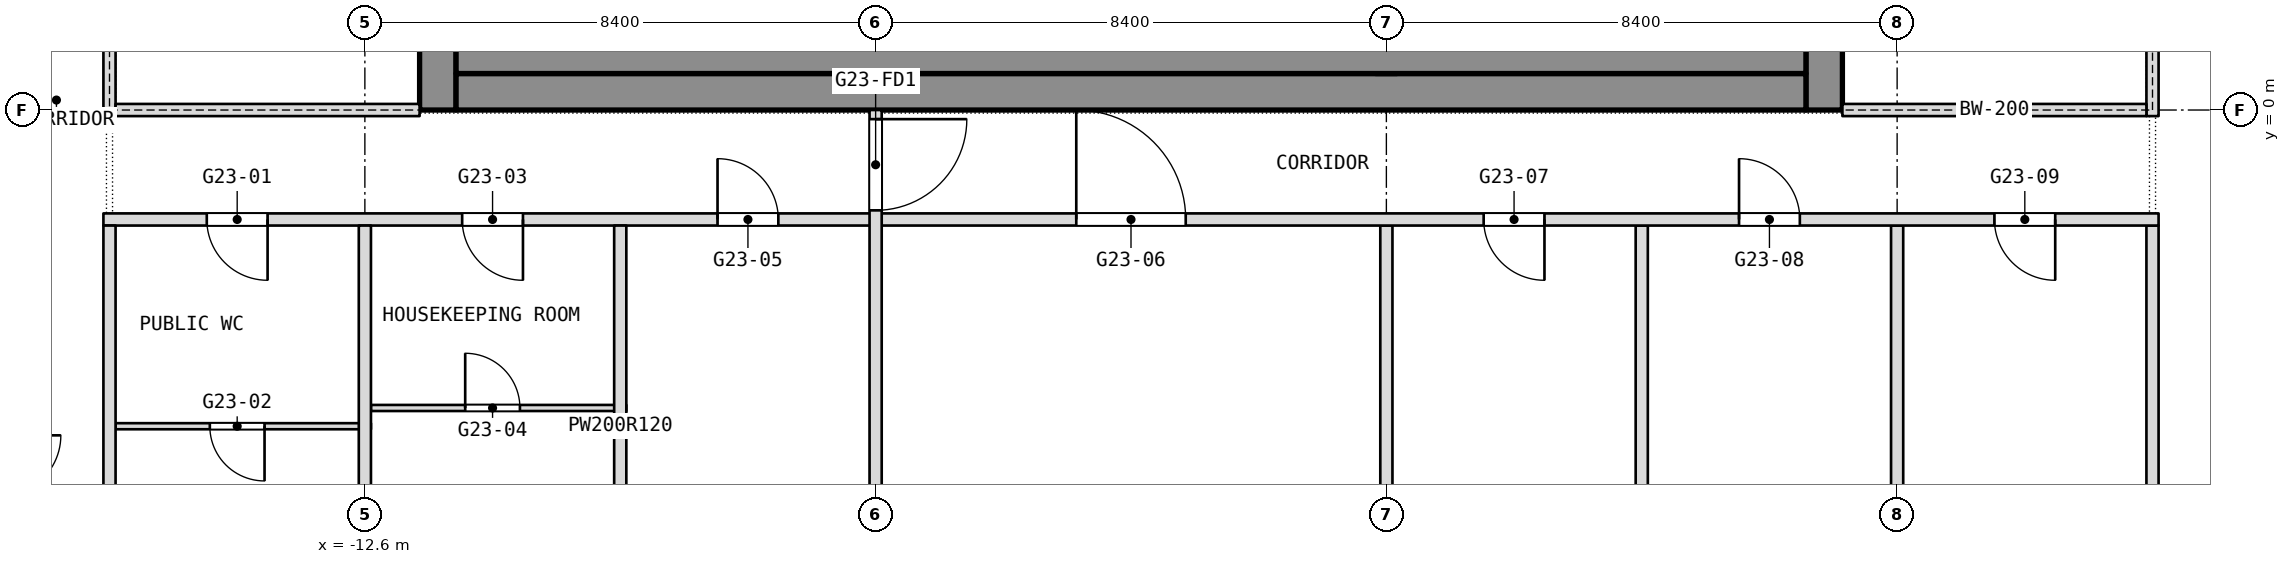
"""IFC4 building model, lengths in metres.
Left out: names, types, materials, properties, quantities, classifications, styles, units other than length and angle.
Written with IfcOpenShell. Run it as: python <this file> out.ifc"""

import sys

from ifc_helpers import new_model, si_unit, direction, frame, frame_2d, origin, place, context, subcontext, project, spatial, rectangle, extrude, element, fill, save


model = new_model("IFC4")
c1 = context("Model", 3, precision=1e-05, world=origin(), true_north=direction((0.0, 1.0)))
c2 = subcontext(c1, "Body", "Model", "MODEL_VIEW")
j1 = project(units=[si_unit("LENGTHUNIT", "METRE"), si_unit("PLANEANGLEUNIT", "RADIAN")], contexts=[c1])
p1 = place(None, origin())
s1 = spatial("IfcSite", under=j1, at=p1, CompositionType="ELEMENT")
p2 = place(p1, origin())
s2 = spatial("IfcBuilding", under=s1, at=p2, CompositionType="ELEMENT")
p3 = place(p2, frame((0.0, 0.0, 270.5)))
s3 = spatial("IfcBuildingStorey", under=s2, at=p3, CompositionType="ELEMENT", Elevation=270.5)
p4 = place(p3, frame((11.4, 0.0, 0.0), z_axis=(0.0, 0.0, 1.0), x_axis=(0.0, 1.0, 0.0)))
e1 = element("IfcWall", 1, at=p4, inside=s3, PredefinedType="SHEAR", context=c2, shape_type="SweptSolid", body=[
    extrude(rectangle(XDim=16.8, YDim=0.6, at=frame_2d((8.4, 0.0))), origin(), (0.0, 0.0, 1.0), 3.6),
])
p5 = place(p4, frame((2.3, 0.0, 0.0)))
e2 = element("IfcOpeningElement", 2, at=p5, cuts=e1, PredefinedType="OPENING", context=c2, shape_type="SweptSolid", body=[
    extrude(rectangle(XDim=1.1, YDim=2.1, at=frame_2d((0.55, 1.05))), frame((0.0, 0.3, 0.0), z_axis=(0.0, -1.0, 0.0), x_axis=(1.0, 0.0, 0.0)), (0.0, 0.0, 1.0), 0.6),
])
p6 = place(p4, frame((4.85, 0.0, 0.0)))
e3 = element("IfcOpeningElement", 3, at=p6, cuts=e1, PredefinedType="OPENING", context=c2, shape_type="SweptSolid", body=[
    extrude(rectangle(XDim=1.1, YDim=2.1, at=frame_2d((0.55, 1.05))), frame((0.0, 0.3, 0.0), z_axis=(0.0, -1.0, 0.0), x_axis=(1.0, 0.0, 0.0)), (0.0, 0.0, 1.0), 0.6),
])
p7 = place(p4, frame((6.825, 0.0, 0.0)))
e4 = element("IfcOpeningElement", 4, at=p7, cuts=e1, PredefinedType="OPENING", context=c2, shape_type="SweptSolid", body=[
    extrude(rectangle(XDim=1.2, YDim=2.1, at=frame_2d((0.6, 1.05))), frame((0.0, 0.3, 0.0), z_axis=(0.0, -1.0, 0.0), x_axis=(1.0, 0.0, 0.0)), (0.0, 0.0, 1.0), 0.6),
])
p8 = place(p4, frame((13.4, 0.0, 0.0)))
e5 = element("IfcOpeningElement", 5, at=p8, cuts=e1, PredefinedType="OPENING", context=c2, shape_type="SweptSolid", body=[
    extrude(rectangle(XDim=1.1, YDim=2.1, at=frame_2d((0.55, 1.05))), frame((0.0, 0.3, 0.0), z_axis=(0.0, -1.0, 0.0), x_axis=(1.0, 0.0, 0.0)), (0.0, 0.0, 1.0), 0.6),
])
p9 = place(p4, frame((10.85, 0.0, 0.0)))
e6 = element("IfcOpeningElement", 6, at=p9, cuts=e1, PredefinedType="OPENING", context=c2, shape_type="SweptSolid", body=[
    extrude(rectangle(XDim=1.1, YDim=2.1, at=frame_2d((0.55, 1.05))), frame((0.0, 0.3, 0.0), z_axis=(0.0, -1.0, 0.0), x_axis=(1.0, 0.0, 0.0)), (0.0, 0.0, 1.0), 0.6),
])
p10 = place(p4, frame((8.775, 0.0, 0.0)))
e7 = element("IfcOpeningElement", 7, at=p10, cuts=e1, PredefinedType="OPENING", context=c2, shape_type="SweptSolid", body=[
    extrude(rectangle(XDim=1.2, YDim=2.1, at=frame_2d((0.6, 1.05))), frame((0.0, 0.3, 0.0), z_axis=(0.0, -1.0, 0.0), x_axis=(1.0, 0.0, 0.0)), (0.0, 0.0, 1.0), 0.6),
])
p11 = place(p3, frame((-11.4, 0.0, 0.0), z_axis=(0.0, 0.0, 1.0), x_axis=(0.0, 1.0, 0.0)))
e8 = element("IfcWall", 8, at=p11, inside=s3, PredefinedType="SHEAR", context=c2, shape_type="SweptSolid", body=[
    extrude(rectangle(XDim=16.8, YDim=0.6, at=frame_2d((8.4, 0.0))), origin(), (0.0, 0.0, 1.0), 3.6),
])
p12 = place(p11, frame((3.6, 0.0, 0.0)))
e9 = element("IfcOpeningElement", 9, at=p12, cuts=e8, PredefinedType="OPENING", context=c2, shape_type="SweptSolid", body=[
    extrude(rectangle(XDim=0.9, YDim=2.1, at=frame_2d((0.45, 1.05))), frame((0.0, 0.3, 0.0), z_axis=(0.0, -1.0, 0.0), x_axis=(1.0, 0.0, 0.0)), (0.0, 0.0, 1.0), 0.6),
])
p13 = place(p11, frame((6.825, 0.0, 0.0)))
e10 = element("IfcOpeningElement", 10, at=p13, cuts=e8, PredefinedType="OPENING", context=c2, shape_type="SweptSolid", body=[
    extrude(rectangle(XDim=1.2, YDim=2.1, at=frame_2d((0.6, 1.05))), frame((0.0, 0.3, 0.0), z_axis=(0.0, -1.0, 0.0), x_axis=(1.0, 0.0, 0.0)), (0.0, 0.0, 1.0), 0.6),
])
p14 = place(p11, frame((14.137, 0.0, 0.0)))
e11 = element("IfcOpeningElement", 11, at=p14, cuts=e8, PredefinedType="OPENING", context=c2, shape_type="SweptSolid", body=[
    extrude(rectangle(XDim=0.9, YDim=2.1, at=frame_2d((0.45, 1.05))), frame((0.0, 0.3, 0.0), z_axis=(0.0, -1.0, 0.0), x_axis=(1.0, 0.0, 0.0)), (0.0, 0.0, 1.0), 0.6),
])
p15 = place(p11, frame((11.512, 0.0, 0.0)))
e12 = element("IfcOpeningElement", 12, at=p15, cuts=e8, PredefinedType="OPENING", context=c2, shape_type="SweptSolid", body=[
    extrude(rectangle(XDim=0.9, YDim=2.1, at=frame_2d((0.45, 1.05))), frame((0.0, 0.3, 0.0), z_axis=(0.0, -1.0, 0.0), x_axis=(1.0, 0.0, 0.0)), (0.0, 0.0, 1.0), 0.6),
])
p16 = place(p11, frame((8.775, 0.0, 0.0)))
e13 = element("IfcOpeningElement", 13, at=p16, cuts=e8, PredefinedType="OPENING", context=c2, shape_type="SweptSolid", body=[
    extrude(rectangle(XDim=1.2, YDim=2.1, at=frame_2d((0.6, 1.05))), frame((0.0, 0.3, 0.0), z_axis=(0.0, -1.0, 0.0), x_axis=(1.0, 0.0, 0.0)), (0.0, 0.0, 1.0), 0.6),
])
p17 = place(p3, frame((-11.1, 0.3, 0.0), z_axis=(0.0, 0.0, 1.0), x_axis=(1.0, 0.0, 0.0)))
e14 = element("IfcWall", 14, at=p17, inside=s3, PredefinedType="SHEAR", context=c2, shape_type="SweptSolid", body=[
    extrude(rectangle(XDim=22.2, YDim=0.6, at=frame_2d((11.1, 0.0))), origin(), (0.0, 0.0, 1.0), 3.6),
])
p18 = place(p3, frame((-4.2, 0.6, 0.0), z_axis=(0.0, 0.0, 1.0), x_axis=(0.0, 1.0, 0.0)))
e15 = element("IfcWall", 15, at=p18, inside=s3, PredefinedType="SHEAR", context=c2, shape_type="SweptSolid", body=[
    extrude(rectangle(XDim=15.6, YDim=0.35, at=frame_2d((7.8, 0.0))), origin(), (0.0, 0.0, 1.0), 3.6),
])
p19 = place(p18, frame((8.7, 0.0, 0.0)))
e16 = element("IfcOpeningElement", 16, at=p19, cuts=e15, PredefinedType="OPENING", context=c2, shape_type="SweptSolid", body=[
    extrude(rectangle(XDim=1.2, YDim=2.1, at=frame_2d((0.6, 1.05))), frame((0.0, 0.175, 0.0), z_axis=(0.0, -1.0, 0.0), x_axis=(1.0, 0.0, 0.0)), (0.0, 0.0, 1.0), 0.35),
])
p20 = place(p3, frame((4.2, 0.6, 0.0), z_axis=(0.0, 0.0, 1.0), x_axis=(0.0, 1.0, 0.0)))
e17 = element("IfcWall", 17, at=p20, inside=s3, PredefinedType="SHEAR", context=c2, shape_type="SweptSolid", body=[
    extrude(rectangle(XDim=15.6, YDim=0.35, at=frame_2d((7.8, 0.0))), origin(), (0.0, 0.0, 1.0), 3.6),
])
p21 = place(p20, frame((6.15, 0.0, 0.0)))
e18 = element("IfcOpeningElement", 18, at=p21, cuts=e17, PredefinedType="OPENING", context=c2, shape_type="SweptSolid", body=[
    extrude(rectangle(XDim=1.2, YDim=2.1, at=frame_2d((0.6, 1.05))), frame((0.0, 0.175, 0.0), z_axis=(0.0, -1.0, 0.0), x_axis=(1.0, 0.0, 0.0)), (0.0, 0.0, 1.0), 0.35),
])
p22 = place(p3, frame((16.8, -11.8, 0.0), z_axis=(0.0, 0.0, 1.0), x_axis=(0.0, 1.0, 0.0)))
e19 = element("IfcWall", 19, at=p22, inside=s3, PredefinedType="PARTITIONING", context=c2, shape_type="SweptSolid", body=[
    extrude(rectangle(XDim=9.9, YDim=0.2, at=frame_2d((4.95, 0.0))), origin(), (0.0, 0.0, 1.0), 3.34),
])
for number, where, z_axis, x_axis in (
    (20, (12.6, -11.6, 0.0), (0.0, 0.0, 1.0), (0.0, 1.0, 0.0)),
    (21, (8.4, -11.6, 0.0), (0.0, 0.0, 1.0), (0.0, 1.0, 0.0)),
):
    element("IfcWall", number, at=place(p3, frame(where, z_axis=z_axis, x_axis=x_axis)), inside=s3, PredefinedType="PARTITIONING", context=c2, shape_type="SweptSolid", body=[
        extrude(rectangle(XDim=9.7, YDim=0.2, at=frame_2d((4.85, 0.0))), origin(), (0.0, 0.0, 1.0), 3.34),
    ])
p23 = place(p3, frame((-16.7, -5.2, 0.0), z_axis=(0.0, 0.0, 1.0), x_axis=(1.0, 0.0, 0.0)))
e22 = element("IfcWall", 22, at=p23, inside=s3, PredefinedType="PARTITIONING", context=c2, shape_type="SweptSolid", body=[
    extrude(rectangle(XDim=4.2, YDim=0.1, at=frame_2d((2.1, 0.0))), origin(), (0.0, 0.0, 1.0), 3.34),
])
p24 = place(p23, frame((1.55, 0.0, 0.0)))
e23 = element("IfcOpeningElement", 23, at=p24, cuts=e22, PredefinedType="OPENING", context=c2, shape_type="SweptSolid", body=[
    extrude(rectangle(XDim=0.9, YDim=2.1, at=frame_2d((0.45, 1.05))), frame((0.0, 0.05, 0.0), z_axis=(0.0, -1.0, 0.0), x_axis=(1.0, 0.0, 0.0)), (0.0, 0.0, 1.0), 0.1),
])
p25 = place(p3, frame((-12.5, -4.9, 0.0), z_axis=(0.0, 0.0, 1.0), x_axis=(1.0, 0.0, 0.0)))
e24 = element("IfcWall", 24, at=p25, inside=s3, PredefinedType="PARTITIONING", context=c2, shape_type="SweptSolid", body=[
    extrude(rectangle(XDim=4.2, YDim=0.1, at=frame_2d((2.1, 0.0))), origin(), (0.0, 0.0, 1.0), 3.34),
])
p26 = place(p25, frame((1.55, 0.0, 0.0)))
e25 = element("IfcOpeningElement", 25, at=p26, cuts=e24, PredefinedType="OPENING", context=c2, shape_type="SweptSolid", body=[
    extrude(rectangle(XDim=0.9, YDim=2.1, at=frame_2d((0.45, 1.05))), frame((0.0, 0.05, 0.0), z_axis=(0.0, -1.0, 0.0), x_axis=(1.0, 0.0, 0.0)), (0.0, 0.0, 1.0), 0.1),
])
p27 = place(p3, frame((4.2, -11.6, 0.0), z_axis=(0.0, 0.0, 1.0), x_axis=(0.0, 1.0, 0.0)))
e26 = element("IfcWall", 26, at=p27, inside=s3, PredefinedType="PARTITIONING", context=c2, shape_type="SweptSolid", body=[
    extrude(rectangle(XDim=9.7, YDim=0.2, at=frame_2d((4.85, 0.0))), origin(), (0.0, 0.0, 1.0), 3.34),
])
p28 = place(p3, frame((-16.9, -1.8, 0.0), z_axis=(0.0, 0.0, 1.0), x_axis=(1.0, 0.0, 0.0)))
e27 = element("IfcWall", 27, at=p28, inside=s3, PredefinedType="PARTITIONING", context=c2, shape_type="SweptSolid", body=[
    extrude(rectangle(XDim=33.8, YDim=0.2, at=frame_2d((16.9, 0.0))), origin(), (0.0, 0.0, 1.0), 3.34),
])
p29 = place(p28, frame((1.7, 0.0, 0.0)))
e28 = element("IfcOpeningElement", 28, at=p29, cuts=e27, PredefinedType="OPENING", context=c2, shape_type="SweptSolid", body=[
    extrude(rectangle(XDim=1.0, YDim=2.1, at=frame_2d((0.5, 1.05))), frame((0.0, 0.1, 0.0), z_axis=(0.0, -1.0, 0.0), x_axis=(1.0, 0.0, 0.0)), (0.0, 0.0, 1.0), 0.2),
])
p30 = place(p28, frame((5.9, 0.0, 0.0)))
e29 = element("IfcOpeningElement", 29, at=p30, cuts=e27, PredefinedType="OPENING", context=c2, shape_type="SweptSolid", body=[
    extrude(rectangle(XDim=1.0, YDim=2.1, at=frame_2d((0.5, 1.05))), frame((0.0, 0.1, 0.0), z_axis=(0.0, -1.0, 0.0), x_axis=(1.0, 0.0, 0.0)), (0.0, 0.0, 1.0), 0.2),
])
p31 = place(p28, frame((10.1, 0.0, 0.0)))
e30 = element("IfcOpeningElement", 30, at=p31, cuts=e27, PredefinedType="OPENING", context=c2, shape_type="SweptSolid", body=[
    extrude(rectangle(XDim=1.0, YDim=2.1, at=frame_2d((0.5, 1.05))), frame((0.0, 0.1, 0.0), z_axis=(0.0, -1.0, 0.0), x_axis=(1.0, 0.0, 0.0)), (0.0, 0.0, 1.0), 0.2),
])
p32 = place(p28, frame((16.0, 0.0, 0.0)))
e31 = element("IfcOpeningElement", 31, at=p32, cuts=e27, PredefinedType="OPENING", context=c2, shape_type="SweptSolid", body=[
    extrude(rectangle(XDim=1.8, YDim=2.1, at=frame_2d((0.9, 1.05))), frame((0.0, 0.1, 0.0), z_axis=(0.0, -1.0, 0.0), x_axis=(1.0, 0.0, 0.0)), (0.0, 0.0, 1.0), 0.2),
])
p33 = place(p28, frame((22.7, 0.0, 0.0)))
e32 = element("IfcOpeningElement", 32, at=p33, cuts=e27, PredefinedType="OPENING", context=c2, shape_type="SweptSolid", body=[
    extrude(rectangle(XDim=1.0, YDim=2.1, at=frame_2d((0.5, 1.05))), frame((0.0, 0.1, 0.0), z_axis=(0.0, -1.0, 0.0), x_axis=(1.0, 0.0, 0.0)), (0.0, 0.0, 1.0), 0.2),
])
p34 = place(p28, frame((26.9, 0.0, 0.0)))
e33 = element("IfcOpeningElement", 33, at=p34, cuts=e27, PredefinedType="OPENING", context=c2, shape_type="SweptSolid", body=[
    extrude(rectangle(XDim=1.0, YDim=2.1, at=frame_2d((0.5, 1.05))), frame((0.0, 0.1, 0.0), z_axis=(0.0, -1.0, 0.0), x_axis=(1.0, 0.0, 0.0)), (0.0, 0.0, 1.0), 0.2),
])
p35 = place(p28, frame((31.1, 0.0, 0.0)))
e34 = element("IfcOpeningElement", 34, at=p35, cuts=e27, PredefinedType="OPENING", context=c2, shape_type="SweptSolid", body=[
    extrude(rectangle(XDim=1.0, YDim=2.1, at=frame_2d((0.5, 1.05))), frame((0.0, 0.1, 0.0), z_axis=(0.0, -1.0, 0.0), x_axis=(1.0, 0.0, 0.0)), (0.0, 0.0, 1.0), 0.2),
])
p36 = place(p3, frame((-4.2, -13.6, 0.0), z_axis=(0.0, 0.0, 1.0), x_axis=(0.0, 1.0, 0.0)))
e35 = element("IfcWall", 35, at=p36, inside=s3, PredefinedType="PARTITIONING", context=c2, shape_type="SweptSolid", body=[
    extrude(rectangle(XDim=13.6, YDim=0.2, at=frame_2d((6.8, 0.0))), origin(), (0.0, 0.0, 1.0), 3.34),
])
p37 = place(p36, frame((11.95, 0.0, 0.0)))
e36 = element("IfcOpeningElement", 36, at=p37, cuts=e35, PredefinedType="OPENING", context=c2, shape_type="SweptSolid", body=[
    extrude(rectangle(XDim=1.5, YDim=2.1, at=frame_2d((0.75, 1.05))), frame((0.0, 0.1, 0.0), z_axis=(0.0, -1.0, 0.0), x_axis=(1.0, 0.0, 0.0)), (0.0, 0.0, 1.0), 0.2),
])
p38 = place(p36, frame((0.25, 0.0, 0.0)))
e37 = element("IfcOpeningElement", 37, at=p38, cuts=e35, PredefinedType="OPENING", context=c2, shape_type="SweptSolid", body=[
    extrude(rectangle(XDim=1.5, YDim=2.1, at=frame_2d((0.75, 1.05))), frame((0.0, 0.1, 0.0), z_axis=(0.0, -1.0, 0.0), x_axis=(1.0, 0.0, 0.0)), (0.0, 0.0, 1.0), 0.2),
])
for number, where, z_axis, x_axis in (
    (38, (-8.4, -8.5, 0.0), (0.0, 0.0, 1.0), (0.0, 1.0, 0.0)),
    (39, (-12.6, -8.5, 0.0), (0.0, 0.0, 1.0), (0.0, 1.0, 0.0)),
):
    element("IfcWall", number, at=place(p3, frame(where, z_axis=z_axis, x_axis=x_axis)), inside=s3, PredefinedType="PARTITIONING", context=c2, shape_type="SweptSolid", body=[
        extrude(rectangle(XDim=6.6, YDim=0.2, at=frame_2d((3.3, 0.0))), origin(), (0.0, 0.0, 1.0), 3.34),
    ])
p39 = place(p3, frame((-16.8, -8.7, 0.0), z_axis=(0.0, 0.0, 1.0), x_axis=(0.0, 1.0, 0.0)))
e40 = element("IfcWall", 40, at=p39, inside=s3, PredefinedType="PARTITIONING", context=c2, shape_type="SweptSolid", body=[
    extrude(rectangle(XDim=6.8, YDim=0.2, at=frame_2d((3.4, 0.0))), origin(), (0.0, 0.0, 1.0), 3.34),
])
p40 = place(p3, frame((-11.1, 1.05, 0.0), z_axis=(0.0, 0.0, 1.0), x_axis=(1.0, 0.0, 0.0)))
e41 = element("IfcWall", 41, at=p40, inside=s3, PredefinedType="PARTITIONING", context=c2, shape_type="SweptSolid", body=[
    extrude(rectangle(XDim=22.2, YDim=0.9, at=frame_2d((11.1, 0.0))), origin(), (0.0, 0.0, 1.0), 3.34),
])
p41 = place(p3, frame((-16.8, -0.1, 0.0), z_axis=(0.0, 0.0, 1.0), x_axis=(0.0, 1.0, 0.0)))
e42 = element("IfcWall", 42, at=p41, inside=s3, PredefinedType="PARTITIONING", context=c2, shape_type="SweptSolid", body=[
    extrude(rectangle(XDim=17.0, YDim=0.2, at=frame_2d((8.5, 0.0))), origin(), (0.0, 0.0, 1.0), 3.34),
])
p42 = place(p41, frame((2.2, 0.0, 0.0)))
e43 = element("IfcOpeningElement", 43, at=p42, cuts=e42, PredefinedType="OPENING", context=c2, shape_type="SweptSolid", body=[
    extrude(rectangle(XDim=1.8, YDim=2.1, at=frame_2d((0.9, 1.05))), frame((0.0, 0.1, 0.0), z_axis=(0.0, -1.0, 0.0), x_axis=(1.0, 0.0, 0.0)), (0.0, 0.0, 1.0), 0.2),
])
p43 = place(p41, frame((13.0, 0.0, 0.0)))
e44 = element("IfcOpeningElement", 44, at=p43, cuts=e42, PredefinedType="OPENING", context=c2, shape_type="SweptSolid", body=[
    extrude(rectangle(XDim=1.8, YDim=2.1, at=frame_2d((0.9, 1.05))), frame((0.0, 0.1, 0.0), z_axis=(0.0, -1.0, 0.0), x_axis=(1.0, 0.0, 0.0)), (0.0, 0.0, 1.0), 0.2),
])
p44 = place(p3, frame((-16.7, 0.0, 0.0), z_axis=(0.0, 0.0, 1.0), x_axis=(1.0, 0.0, 0.0)))
e45 = element("IfcWall", 45, at=p44, inside=s3, PredefinedType="PARTITIONING", context=c2, shape_type="SweptSolid", body=[
    extrude(rectangle(XDim=5.0, YDim=0.2, at=frame_2d((2.5, 0.0))), origin(), (0.0, 0.0, 1.0), 3.0),
])
p45 = place(p3, frame((16.8, -0.1, 0.0), z_axis=(0.0, 0.0, 1.0), x_axis=(0.0, 1.0, 0.0)))
e46 = element("IfcWall", 46, at=p45, inside=s3, PredefinedType="PARTITIONING", context=c2, shape_type="SweptSolid", body=[
    extrude(rectangle(XDim=17.0, YDim=0.2, at=frame_2d((8.5, 0.0))), origin(), (0.0, 0.0, 1.0), 3.34),
])
p46 = place(p45, frame((2.2, 0.0, 0.0)))
e47 = element("IfcOpeningElement", 47, at=p46, cuts=e46, PredefinedType="OPENING", context=c2, shape_type="SweptSolid", body=[
    extrude(rectangle(XDim=1.8, YDim=2.1, at=frame_2d((0.9, 1.05))), frame((0.0, 0.1, 0.0), z_axis=(0.0, -1.0, 0.0), x_axis=(1.0, 0.0, 0.0)), (0.0, 0.0, 1.0), 0.2),
])
p47 = place(p45, frame((13.0, 0.0, 0.0)))
e48 = element("IfcOpeningElement", 48, at=p47, cuts=e46, PredefinedType="OPENING", context=c2, shape_type="SweptSolid", body=[
    extrude(rectangle(XDim=1.8, YDim=2.1, at=frame_2d((0.9, 1.05))), frame((0.0, 0.1, 0.0), z_axis=(0.0, -1.0, 0.0), x_axis=(1.0, 0.0, 0.0)), (0.0, 0.0, 1.0), 0.2),
])
p48 = place(p3, frame((11.7, 0.0, 0.0), z_axis=(0.0, 0.0, 1.0), x_axis=(1.0, 0.0, 0.0)))
e49 = element("IfcWall", 49, at=p48, inside=s3, PredefinedType="PARTITIONING", context=c2, shape_type="SweptSolid", body=[
    extrude(rectangle(XDim=5.0, YDim=0.2, at=frame_2d((2.5, 0.0))), origin(), (0.0, 0.0, 1.0), 3.0),
])
p49 = place(p24, origin())
e50 = element("IfcDoor", 50, at=p49, inside=s3, OperationType="SINGLE_SWING_RIGHT", PredefinedType="DOOR", context=c2, shape_type="SweptSolid", body=[
    extrude(rectangle(XDim=0.9, YDim=2.1, at=frame_2d((0.45, 1.05))), frame((0.0, 0.025, 0.0), z_axis=(0.0, -1.0, 0.0), x_axis=(1.0, 0.0, 0.0)), (0.0, 0.0, 1.0), 0.05),
])
fill(e23, e50)
p50 = place(p26, origin())
e51 = element("IfcDoor", 51, at=p50, inside=s3, OperationType="SINGLE_SWING_RIGHT", PredefinedType="DOOR", context=c2, shape_type="SweptSolid", body=[
    extrude(rectangle(XDim=0.9, YDim=2.1, at=frame_2d((0.45, 1.05))), frame((0.0, 0.025, 0.0), z_axis=(0.0, -1.0, 0.0), x_axis=(1.0, 0.0, 0.0)), (0.0, 0.0, 1.0), 0.05),
])
fill(e25, e51)
p51 = place(p29, origin())
e52 = element("IfcDoor", 52, at=p51, inside=s3, OperationType="SINGLE_SWING_LEFT", PredefinedType="DOOR", context=c2, shape_type="SweptSolid", body=[
    extrude(rectangle(XDim=1.0, YDim=2.1, at=frame_2d((0.5, 1.05))), frame((0.0, 0.025, 0.0), z_axis=(0.0, -1.0, 0.0), x_axis=(1.0, 0.0, 0.0)), (0.0, 0.0, 1.0), 0.05),
])
fill(e28, e52)
p52 = place(p30, origin())
e53 = element("IfcDoor", 53, at=p52, inside=s3, OperationType="SINGLE_SWING_LEFT", PredefinedType="DOOR", context=c2, shape_type="SweptSolid", body=[
    extrude(rectangle(XDim=1.0, YDim=2.1, at=frame_2d((0.5, 1.05))), frame((0.0, 0.025, 0.0), z_axis=(0.0, -1.0, 0.0), x_axis=(1.0, 0.0, 0.0)), (0.0, 0.0, 1.0), 0.05),
])
fill(e29, e53)
p53 = place(p31, origin())
e54 = element("IfcDoor", 54, at=p53, inside=s3, OperationType="SINGLE_SWING_RIGHT", PredefinedType="DOOR", context=c2, shape_type="SweptSolid", body=[
    extrude(rectangle(XDim=1.0, YDim=2.1, at=frame_2d((0.5, 1.05))), frame((0.0, 0.025, 0.0), z_axis=(0.0, -1.0, 0.0), x_axis=(1.0, 0.0, 0.0)), (0.0, 0.0, 1.0), 0.05),
])
fill(e30, e54)
p54 = place(p32, origin())
e55 = element("IfcDoor", 55, at=p54, inside=s3, OperationType="DOUBLE_DOOR_SINGLE_SWING", PredefinedType="DOOR", context=c2, shape_type="SweptSolid", body=[
    extrude(rectangle(XDim=1.8, YDim=2.1, at=frame_2d((0.9, 1.05))), frame((0.0, 0.025, 0.0), z_axis=(0.0, -1.0, 0.0), x_axis=(1.0, 0.0, 0.0)), (0.0, 0.0, 1.0), 0.05),
])
fill(e31, e55)
p55 = place(p33, origin())
e56 = element("IfcDoor", 56, at=p55, inside=s3, OperationType="SINGLE_SWING_RIGHT", PredefinedType="DOOR", context=c2, shape_type="SweptSolid", body=[
    extrude(rectangle(XDim=1.0, YDim=2.1, at=frame_2d((0.5, 1.05))), frame((0.0, 0.025, 0.0), z_axis=(0.0, -1.0, 0.0), x_axis=(1.0, 0.0, 0.0)), (0.0, 0.0, 1.0), 0.05),
])
fill(e32, e56)
p56 = place(p34, origin())
e57 = element("IfcDoor", 57, at=p56, inside=s3, OperationType="SINGLE_SWING_LEFT", PredefinedType="DOOR", context=c2, shape_type="SweptSolid", body=[
    extrude(rectangle(XDim=1.0, YDim=2.1, at=frame_2d((0.5, 1.05))), frame((0.0, 0.025, 0.0), z_axis=(0.0, -1.0, 0.0), x_axis=(1.0, 0.0, 0.0)), (0.0, 0.0, 1.0), 0.05),
])
fill(e33, e57)
p57 = place(p35, origin())
e58 = element("IfcDoor", 58, at=p57, inside=s3, OperationType="SINGLE_SWING_RIGHT", PredefinedType="DOOR", context=c2, shape_type="SweptSolid", body=[
    extrude(rectangle(XDim=1.0, YDim=2.1, at=frame_2d((0.5, 1.05))), frame((0.0, 0.025, 0.0), z_axis=(0.0, -1.0, 0.0), x_axis=(1.0, 0.0, 0.0)), (0.0, 0.0, 1.0), 0.05),
])
fill(e34, e58)
p58 = place(p37, origin())
e59 = element("IfcDoor", 59, at=p58, inside=s3, OperationType="DOUBLE_DOOR_DOUBLE_SWING", PredefinedType="DOOR", context=c2, shape_type="SweptSolid", body=[
    extrude(rectangle(XDim=1.5, YDim=2.1, at=frame_2d((0.75, 1.05))), frame((0.0, 0.025, 0.0), z_axis=(0.0, -1.0, 0.0), x_axis=(1.0, 0.0, 0.0)), (0.0, 0.0, 1.0), 0.05),
])
fill(e36, e59)
save(model, sys.argv[1])
